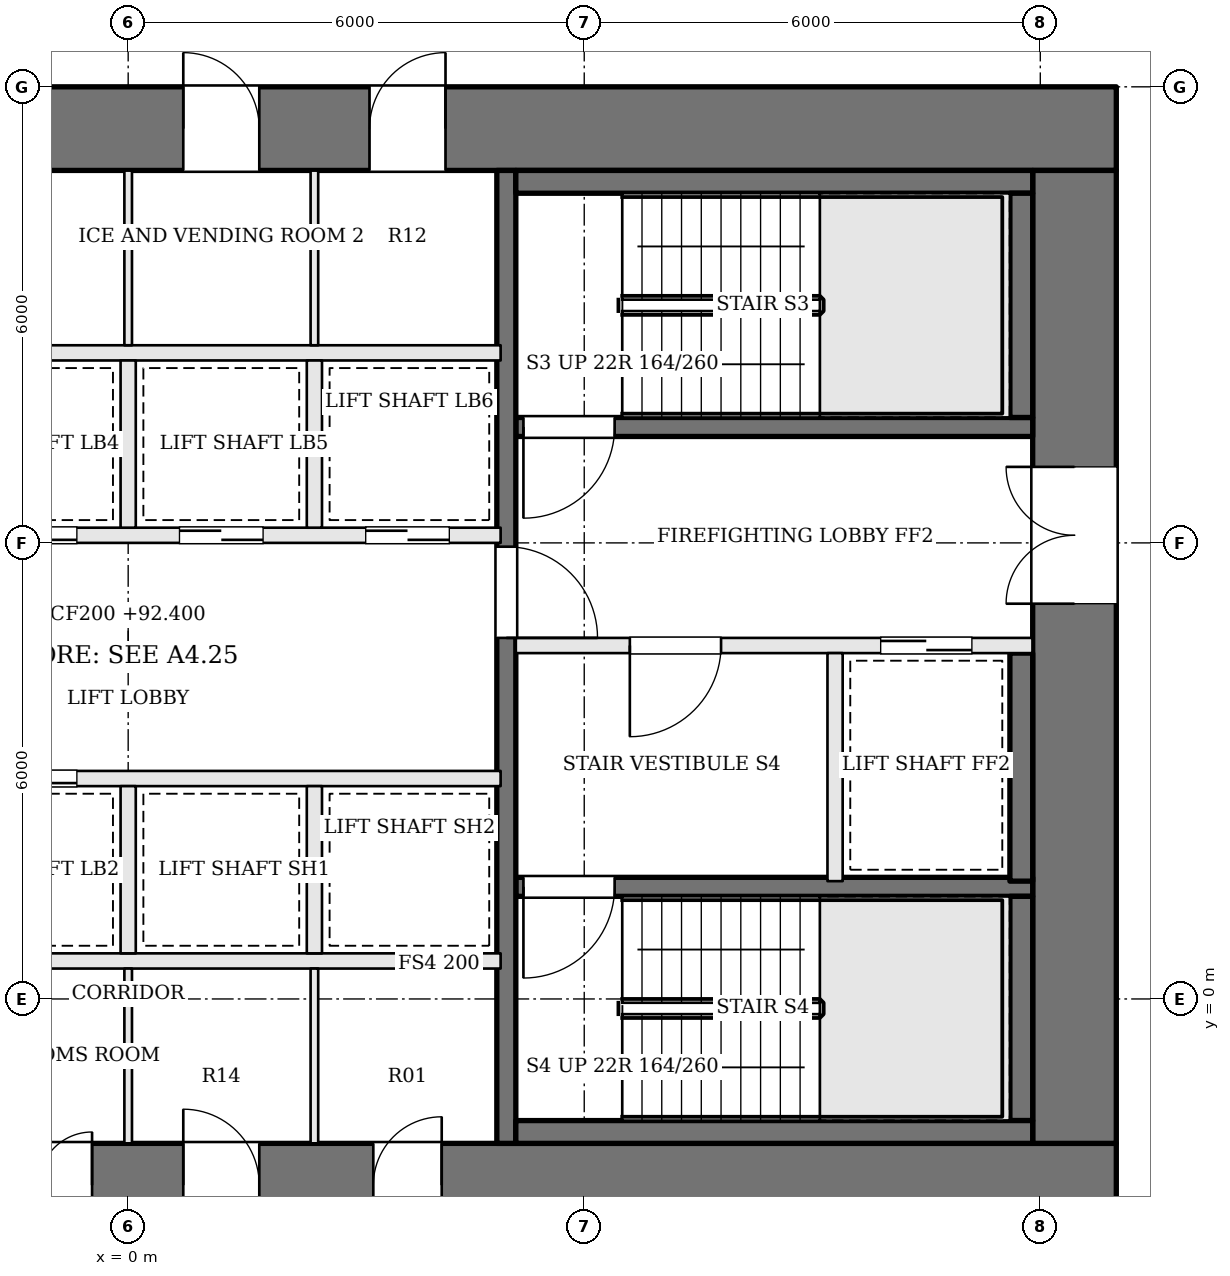
"""IFC4 building model, lengths in metres.
Left out: names, types, materials, properties, quantities, classifications, styles, units other than length and angle.
Written with IfcOpenShell. Run it as: python <this file> out.ifc"""

import sys

from ifc_helpers import new_model, si_unit, direction, frame, frame_2d, origin, place, context, subcontext, project, spatial, rectangle, extrude, element, fill, save


model = new_model("IFC4")
c1 = context("Model", 3, precision=1e-05, world=origin(), true_north=direction((0.0, 1.0)))
c2 = subcontext(c1, "Body", "Model", "MODEL_VIEW")
j1 = project(units=[si_unit("LENGTHUNIT", "METRE"), si_unit("PLANEANGLEUNIT", "RADIAN")], contexts=[c1])
p1 = place(None, origin())
s1 = spatial("IfcSite", under=j1, at=p1, CompositionType="ELEMENT")
p2 = place(p1, origin())
s2 = spatial("IfcBuilding", under=s1, at=p2, CompositionType="ELEMENT")
p3 = place(p2, frame((0.0, 0.0, 92.4)))
s3 = spatial("IfcBuildingStorey", under=s2, at=p3, CompositionType="ELEMENT", Elevation=92.4)
p4 = place(p3, frame((-13.0, 11.45, 0.0), z_axis=(0.0, 0.0, 1.0), x_axis=(1.0, 0.0, 0.0)))
e1 = element("IfcWall", 1, at=p4, inside=s3, PredefinedType="SHEAR", context=c2, shape_type="SweptSolid", body=[
    extrude(rectangle(XDim=26.0, YDim=1.1, at=frame_2d((13.0, 0.0))), origin(), (0.0, 0.0, 1.0), 3.6),
])
p5 = place(p4, frame((8.575, 0.0, 0.0)))
e2 = element("IfcOpeningElement", 2, at=p5, cuts=e1, PredefinedType="OPENING", context=c2, shape_type="SweptSolid", body=[
    extrude(rectangle(XDim=0.7, YDim=2.1, at=frame_2d((0.35, 1.05))), frame((0.0, 0.56, 0.0), z_axis=(0.0, -1.0, 0.0), x_axis=(1.0, 0.0, 0.0)), (0.0, 0.0, 1.0), 1.12),
])
p6 = place(p4, frame((10.875, 0.0, 0.0)))
e3 = element("IfcOpeningElement", 3, at=p6, cuts=e1, PredefinedType="OPENING", context=c2, shape_type="SweptSolid", body=[
    extrude(rectangle(XDim=1.0, YDim=2.1, at=frame_2d((0.5, 1.05))), frame((0.0, 0.56, 0.0), z_axis=(0.0, -1.0, 0.0), x_axis=(1.0, 0.0, 0.0)), (0.0, 0.0, 1.0), 1.12),
])
p7 = place(p4, frame((13.725, 0.0, 0.0)))
e4 = element("IfcOpeningElement", 4, at=p7, cuts=e1, PredefinedType="OPENING", context=c2, shape_type="SweptSolid", body=[
    extrude(rectangle(XDim=1.0, YDim=2.1, at=frame_2d((0.5, 1.05))), frame((0.0, 0.56, 0.0), z_axis=(0.0, -1.0, 0.0), x_axis=(1.0, 0.0, 0.0)), (0.0, 0.0, 1.0), 1.12),
])
p8 = place(p4, frame((16.175, 0.0, 0.0)))
e5 = element("IfcOpeningElement", 5, at=p8, cuts=e1, PredefinedType="OPENING", context=c2, shape_type="SweptSolid", body=[
    extrude(rectangle(XDim=1.0, YDim=2.1, at=frame_2d((0.5, 1.05))), frame((0.0, 0.56, 0.0), z_axis=(0.0, -1.0, 0.0), x_axis=(1.0, 0.0, 0.0)), (0.0, 0.0, 1.0), 1.12),
])
p9 = place(p3, frame((-13.0, -2.45, 0.0), z_axis=(0.0, 0.0, 1.0), x_axis=(1.0, 0.0, 0.0)))
e6 = element("IfcWall", 6, at=p9, inside=s3, PredefinedType="SHEAR", context=c2, shape_type="SweptSolid", body=[
    extrude(rectangle(XDim=26.0, YDim=1.1, at=frame_2d((13.0, 0.0))), origin(), (0.0, 0.0, 1.0), 3.6),
])
p10 = place(p9, frame((9.225, 0.0, 0.0)))
e7 = element("IfcOpeningElement", 7, at=p10, cuts=e6, PredefinedType="OPENING", context=c2, shape_type="SweptSolid", body=[
    extrude(rectangle(XDim=1.0, YDim=2.1, at=frame_2d((0.5, 1.05))), frame((0.0, 0.56, 0.0), z_axis=(0.0, -1.0, 0.0), x_axis=(1.0, 0.0, 0.0)), (0.0, 0.0, 1.0), 1.12),
])
p11 = place(p9, frame((11.825, 0.0, 0.0)))
e8 = element("IfcOpeningElement", 8, at=p11, cuts=e6, PredefinedType="OPENING", context=c2, shape_type="SweptSolid", body=[
    extrude(rectangle(XDim=0.7, YDim=2.1, at=frame_2d((0.35, 1.05))), frame((0.0, 0.56, 0.0), z_axis=(0.0, -1.0, 0.0), x_axis=(1.0, 0.0, 0.0)), (0.0, 0.0, 1.0), 1.12),
])
p12 = place(p9, frame((13.725, 0.0, 0.0)))
e9 = element("IfcOpeningElement", 9, at=p12, cuts=e6, PredefinedType="OPENING", context=c2, shape_type="SweptSolid", body=[
    extrude(rectangle(XDim=1.0, YDim=2.1, at=frame_2d((0.5, 1.05))), frame((0.0, 0.56, 0.0), z_axis=(0.0, -1.0, 0.0), x_axis=(1.0, 0.0, 0.0)), (0.0, 0.0, 1.0), 1.12),
])
p13 = place(p9, frame((16.225, 0.0, 0.0)))
e10 = element("IfcOpeningElement", 10, at=p13, cuts=e6, PredefinedType="OPENING", context=c2, shape_type="SweptSolid", body=[
    extrude(rectangle(XDim=0.9, YDim=2.1, at=frame_2d((0.45, 1.05))), frame((0.0, 0.56, 0.0), z_axis=(0.0, -1.0, 0.0), x_axis=(1.0, 0.0, 0.0)), (0.0, 0.0, 1.0), 1.12),
])
p14 = place(p3, frame((12.45, -1.9, 0.0), z_axis=(0.0, 0.0, 1.0), x_axis=(0.0, 1.0, 0.0)))
e11 = element("IfcWall", 11, at=p14, inside=s3, PredefinedType="SHEAR", context=c2, shape_type="SweptSolid", body=[
    extrude(rectangle(XDim=12.8, YDim=1.1, at=frame_2d((6.4, 0.0))), origin(), (0.0, 0.0, 1.0), 3.6),
])
p15 = place(p14, frame((7.1, 0.0, 0.0)))
e12 = element("IfcOpeningElement", 12, at=p15, cuts=e11, PredefinedType="OPENING", context=c2, shape_type="SweptSolid", body=[
    extrude(rectangle(XDim=1.8, YDim=2.1, at=frame_2d((0.9, 1.05))), frame((0.0, 0.56, 0.0), z_axis=(0.0, -1.0, 0.0), x_axis=(1.0, 0.0, 0.0)), (0.0, 0.0, 1.0), 1.12),
])
p16 = place(p3, frame((11.9, 7.525, 0.0), z_axis=(0.0, 0.0, 1.0), x_axis=(-1.0, 0.0, 0.0)))
e13 = element("IfcWall", 13, at=p16, inside=s3, PredefinedType="SOLIDWALL", context=c2, shape_type="SweptSolid", body=[
    extrude(rectangle(XDim=6.8, YDim=0.25, at=frame_2d((3.4, 0.0))), origin(), (0.0, 0.0, 1.0), 3.4),
])
p17 = place(p16, frame((5.5, 0.0, 0.0)))
e14 = element("IfcOpeningElement", 14, at=p17, cuts=e13, PredefinedType="OPENING", context=c2, shape_type="SweptSolid", body=[
    extrude(rectangle(XDim=1.2, YDim=2.1, at=frame_2d((0.6, 1.05))), frame((0.0, 0.135, 0.0), z_axis=(0.0, -1.0, 0.0), x_axis=(1.0, 0.0, 0.0)), (0.0, 0.0, 1.0), 0.27),
])
p18 = place(p3, frame((11.9, 4.65, 0.0), z_axis=(0.0, 0.0, 1.0), x_axis=(-1.0, 0.0, 0.0)))
e15 = element("IfcWall", 15, at=p18, inside=s3, PredefinedType="SOLIDWALL", context=c2, shape_type="SweptSolid", body=[
    extrude(rectangle(XDim=6.8, YDim=0.2, at=frame_2d((3.4, 0.0))), origin(), (0.0, 0.0, 1.0), 3.4),
])
p19 = place(p18, frame((4.1, 0.0, 0.0)))
e16 = element("IfcOpeningElement", 16, at=p19, cuts=e15, PredefinedType="OPENING", context=c2, shape_type="SweptSolid", body=[
    extrude(rectangle(XDim=1.2, YDim=2.1, at=frame_2d((0.6, 1.05))), frame((0.0, 0.11, 0.0), z_axis=(0.0, -1.0, 0.0), x_axis=(1.0, 0.0, 0.0)), (0.0, 0.0, 1.0), 0.22),
])
p20 = place(p18, frame((0.8, 0.0, 0.0)))
e17 = element("IfcOpeningElement", 17, at=p20, cuts=e15, PredefinedType="OPENING", context=c2, shape_type="SweptSolid", body=[
    extrude(rectangle(XDim=1.2, YDim=2.1, at=frame_2d((0.6, 1.05))), frame((0.0, 0.11, 0.0), z_axis=(0.0, -1.0, 0.0), x_axis=(1.0, 0.0, 0.0)), (0.0, 0.0, 1.0), 0.22),
])
p21 = place(p3, frame((11.9, 1.475, 0.0), z_axis=(0.0, 0.0, 1.0), x_axis=(-1.0, 0.0, 0.0)))
e18 = element("IfcWall", 18, at=p21, inside=s3, PredefinedType="SOLIDWALL", context=c2, shape_type="SweptSolid", body=[
    extrude(rectangle(XDim=6.8, YDim=0.25, at=frame_2d((3.4, 0.0))), origin(), (0.0, 0.0, 1.0), 3.4),
])
p22 = place(p21, frame((5.5, 0.0, 0.0)))
e19 = element("IfcOpeningElement", 19, at=p22, cuts=e18, PredefinedType="OPENING", context=c2, shape_type="SweptSolid", body=[
    extrude(rectangle(XDim=1.2, YDim=2.1, at=frame_2d((0.6, 1.05))), frame((0.0, 0.135, 0.0), z_axis=(0.0, -1.0, 0.0), x_axis=(1.0, 0.0, 0.0)), (0.0, 0.0, 1.0), 0.27),
])
p23 = place(p3, frame((9.3, 4.55, 0.0), z_axis=(0.0, 0.0, 1.0), x_axis=(0.0, -1.0, 0.0)))
e20 = element("IfcWall", 20, at=p23, inside=s3, PredefinedType="SOLIDWALL", context=c2, shape_type="SweptSolid", body=[
    extrude(rectangle(XDim=3.0, YDim=0.2, at=frame_2d((1.5, 0.0))), origin(), (0.0, 0.0, 1.0), 3.4),
])
p24 = place(p3, frame((4.975, 10.9, 0.0), z_axis=(0.0, 0.0, 1.0), x_axis=(0.0, -1.0, 0.0)))
e21 = element("IfcWall", 21, at=p24, inside=s3, PredefinedType="SOLIDWALL", context=c2, shape_type="SweptSolid", body=[
    extrude(rectangle(XDim=12.8, YDim=0.25, at=frame_2d((6.4, 0.0))), origin(), (0.0, 0.0, 1.0), 3.4),
])
p25 = place(p24, frame((4.95, 0.0, 0.0)))
e22 = element("IfcOpeningElement", 22, at=p25, cuts=e21, PredefinedType="OPENING", context=c2, shape_type="SweptSolid", body=[
    extrude(rectangle(XDim=1.2, YDim=2.1, at=frame_2d((0.6, 1.05))), frame((0.0, 0.135, 0.0), z_axis=(0.0, -1.0, 0.0), x_axis=(1.0, 0.0, 0.0)), (0.0, 0.0, 1.0), 0.27),
])
p26 = place(p3, frame((11.9, 10.75, 0.0), z_axis=(0.0, 0.0, 1.0), x_axis=(-1.0, 0.0, 0.0)))
e23 = element("IfcWall", 23, at=p26, inside=s3, PredefinedType="SOLIDWALL", context=c2, shape_type="SweptSolid", body=[
    extrude(rectangle(XDim=6.8, YDim=0.3, at=frame_2d((3.4, 0.0))), origin(), (0.0, 0.0, 1.0), 3.4),
])
p27 = place(p3, frame((11.75, 10.6, 0.0), z_axis=(0.0, 0.0, 1.0), x_axis=(0.0, -1.0, 0.0)))
e24 = element("IfcWall", 24, at=p27, inside=s3, PredefinedType="SOLIDWALL", context=c2, shape_type="SweptSolid", body=[
    extrude(rectangle(XDim=2.95, YDim=0.3, at=frame_2d((1.475, 0.0))), origin(), (0.0, 0.0, 1.0), 3.4),
])
p28 = place(p3, frame((11.75, 4.55, 0.0), z_axis=(0.0, 0.0, 1.0), x_axis=(0.0, -1.0, 0.0)))
e25 = element("IfcWall", 25, at=p28, inside=s3, PredefinedType="SOLIDWALL", context=c2, shape_type="SweptSolid", body=[
    extrude(rectangle(XDim=3.0, YDim=0.3, at=frame_2d((1.5, 0.0))), origin(), (0.0, 0.0, 1.0), 3.4),
])
p29 = place(p3, frame((11.75, 1.35, 0.0), z_axis=(0.0, 0.0, 1.0), x_axis=(0.0, -1.0, 0.0)))
e26 = element("IfcWall", 26, at=p29, inside=s3, PredefinedType="SOLIDWALL", context=c2, shape_type="SweptSolid", body=[
    extrude(rectangle(XDim=2.95, YDim=0.3, at=frame_2d((1.475, 0.0))), origin(), (0.0, 0.0, 1.0), 3.4),
])
p30 = place(p3, frame((11.9, -1.75, 0.0), z_axis=(0.0, 0.0, 1.0), x_axis=(-1.0, 0.0, 0.0)))
e27 = element("IfcWall", 27, at=p30, inside=s3, PredefinedType="SOLIDWALL", context=c2, shape_type="SweptSolid", body=[
    extrude(rectangle(XDim=6.8, YDim=0.3, at=frame_2d((3.4, 0.0))), origin(), (0.0, 0.0, 1.0), 3.4),
])
p31 = place(p3, frame((-4.9, 0.5, 0.0), z_axis=(0.0, 0.0, 1.0), x_axis=(1.0, 0.0, 0.0)))
e28 = element("IfcWall", 28, at=p31, inside=s3, PredefinedType="SOLIDWALL", context=c2, shape_type="SweptSolid", body=[
    extrude(rectangle(XDim=9.8, YDim=0.2, at=frame_2d((4.9, 0.0))), origin(), (0.0, 0.0, 1.0), 3.4),
])
p32 = place(p3, frame((-4.9, 2.9, 0.0), z_axis=(0.0, 0.0, 1.0), x_axis=(1.0, 0.0, 0.0)))
e29 = element("IfcWall", 29, at=p32, inside=s3, PredefinedType="SOLIDWALL", context=c2, shape_type="SweptSolid", body=[
    extrude(rectangle(XDim=9.8, YDim=0.2, at=frame_2d((4.9, 0.0))), origin(), (0.0, 0.0, 1.0), 3.4),
])
p33 = place(p32, frame((0.675, 0.0, 0.0)))
e30 = element("IfcOpeningElement", 30, at=p33, cuts=e29, PredefinedType="OPENING", context=c2, shape_type="SweptSolid", body=[
    extrude(rectangle(XDim=1.1, YDim=2.1, at=frame_2d((0.55, 1.05))), frame((0.0, 0.11, 0.0), z_axis=(0.0, -1.0, 0.0), x_axis=(1.0, 0.0, 0.0)), (0.0, 0.0, 1.0), 0.22),
])
p34 = place(p32, frame((3.125, 0.0, 0.0)))
e31 = element("IfcOpeningElement", 31, at=p34, cuts=e29, PredefinedType="OPENING", context=c2, shape_type="SweptSolid", body=[
    extrude(rectangle(XDim=1.1, YDim=2.1, at=frame_2d((0.55, 1.05))), frame((0.0, 0.11, 0.0), z_axis=(0.0, -1.0, 0.0), x_axis=(1.0, 0.0, 0.0)), (0.0, 0.0, 1.0), 0.22),
])
p35 = place(p3, frame((-4.9, 6.1, 0.0), z_axis=(0.0, 0.0, 1.0), x_axis=(1.0, 0.0, 0.0)))
e32 = element("IfcWall", 32, at=p35, inside=s3, PredefinedType="SOLIDWALL", context=c2, shape_type="SweptSolid", body=[
    extrude(rectangle(XDim=9.8, YDim=0.2, at=frame_2d((4.9, 0.0))), origin(), (0.0, 0.0, 1.0), 3.4),
])
p36 = place(p35, frame((0.675, 0.0, 0.0)))
e33 = element("IfcOpeningElement", 33, at=p36, cuts=e32, PredefinedType="OPENING", context=c2, shape_type="SweptSolid", body=[
    extrude(rectangle(XDim=1.1, YDim=2.1, at=frame_2d((0.55, 1.05))), frame((0.0, 0.11, 0.0), z_axis=(0.0, -1.0, 0.0), x_axis=(1.0, 0.0, 0.0)), (0.0, 0.0, 1.0), 0.22),
])
p37 = place(p35, frame((3.125, 0.0, 0.0)))
e34 = element("IfcOpeningElement", 34, at=p37, cuts=e32, PredefinedType="OPENING", context=c2, shape_type="SweptSolid", body=[
    extrude(rectangle(XDim=1.1, YDim=2.1, at=frame_2d((0.55, 1.05))), frame((0.0, 0.11, 0.0), z_axis=(0.0, -1.0, 0.0), x_axis=(1.0, 0.0, 0.0)), (0.0, 0.0, 1.0), 0.22),
])
p38 = place(p35, frame((5.575, 0.0, 0.0)))
e35 = element("IfcOpeningElement", 35, at=p38, cuts=e32, PredefinedType="OPENING", context=c2, shape_type="SweptSolid", body=[
    extrude(rectangle(XDim=1.1, YDim=2.1, at=frame_2d((0.55, 1.05))), frame((0.0, 0.11, 0.0), z_axis=(0.0, -1.0, 0.0), x_axis=(1.0, 0.0, 0.0)), (0.0, 0.0, 1.0), 0.22),
])
p39 = place(p35, frame((8.025, 0.0, 0.0)))
e36 = element("IfcOpeningElement", 36, at=p39, cuts=e32, PredefinedType="OPENING", context=c2, shape_type="SweptSolid", body=[
    extrude(rectangle(XDim=1.1, YDim=2.1, at=frame_2d((0.55, 1.05))), frame((0.0, 0.11, 0.0), z_axis=(0.0, -1.0, 0.0), x_axis=(1.0, 0.0, 0.0)), (0.0, 0.0, 1.0), 0.22),
])
p40 = place(p3, frame((-4.9, 8.5, 0.0), z_axis=(0.0, 0.0, 1.0), x_axis=(1.0, 0.0, 0.0)))
e37 = element("IfcWall", 37, at=p40, inside=s3, PredefinedType="SOLIDWALL", context=c2, shape_type="SweptSolid", body=[
    extrude(rectangle(XDim=9.8, YDim=0.2, at=frame_2d((4.9, 0.0))), origin(), (0.0, 0.0, 1.0), 3.4),
])
for number, where, z_axis, x_axis in (
    (38, (0.0, 0.6, 0.0), (0.0, 0.0, 1.0), (0.0, 1.0, 0.0)),
    (39, (2.45, 0.6, 0.0), (0.0, 0.0, 1.0), (0.0, 1.0, 0.0)),
    (40, (0.0, 6.2, 0.0), (0.0, 0.0, 1.0), (0.0, 1.0, 0.0)),
    (41, (2.45, 6.2, 0.0), (0.0, 0.0, 1.0), (0.0, 1.0, 0.0)),
):
    element("IfcWall", number, at=place(p3, frame(where, z_axis=z_axis, x_axis=x_axis)), inside=s3, PredefinedType="SOLIDWALL", context=c2, shape_type="SweptSolid", body=[
        extrude(rectangle(XDim=2.2, YDim=0.2, at=frame_2d((1.1, 0.0))), origin(), (0.0, 0.0, 1.0), 3.4),
    ])
for number, where, z_axis, x_axis in (
    (42, (0.0, -1.9, 0.0), (0.0, 0.0, 1.0), (0.0, 1.0, 0.0)),
    (43, (2.45, -1.9, 0.0), (0.0, 0.0, 1.0), (0.0, 1.0, 0.0)),
    (44, (0.0, 8.6, 0.0), (0.0, 0.0, 1.0), (0.0, 1.0, 0.0)),
    (45, (2.45, 8.6, 0.0), (0.0, 0.0, 1.0), (0.0, 1.0, 0.0)),
):
    element("IfcWall", number, at=place(p3, frame(where, z_axis=z_axis, x_axis=x_axis)), inside=s3, PredefinedType="PARTITIONING", context=c2, shape_type="SweptSolid", body=[
        extrude(rectangle(XDim=2.3, YDim=0.1, at=frame_2d((1.15, 0.0))), origin(), (0.0, 0.0, 1.0), 3.4),
    ])
p41 = place(p15, origin())
e46 = element("IfcDoor", 46, at=p41, inside=s3, OperationType="DOUBLE_DOOR_SINGLE_SWING", PredefinedType="DOOR", context=c2, shape_type="SweptSolid", body=[
    extrude(rectangle(XDim=1.8, YDim=2.1, at=frame_2d((0.9, 1.05))), frame((0.0, 0.025, 0.0), z_axis=(0.0, -1.0, 0.0), x_axis=(1.0, 0.0, 0.0)), (0.0, 0.0, 1.0), 0.05),
])
fill(e12, e46)
p42 = place(p25, origin())
e47 = element("IfcDoor", 47, at=p42, inside=s3, OperationType="SINGLE_SWING_RIGHT", PredefinedType="DOOR", context=c2, shape_type="SweptSolid", body=[
    extrude(rectangle(XDim=1.2, YDim=2.1, at=frame_2d((0.6, 1.05))), frame((0.0, 0.025, 0.0), z_axis=(0.0, -1.0, 0.0), x_axis=(1.0, 0.0, 0.0)), (0.0, 0.0, 1.0), 0.05),
])
fill(e22, e47)
p43 = place(p19, origin())
e48 = element("IfcDoor", 48, at=p43, inside=s3, OperationType="SINGLE_SWING_RIGHT", PredefinedType="DOOR", context=c2, shape_type="SweptSolid", body=[
    extrude(rectangle(XDim=1.2, YDim=2.1, at=frame_2d((0.6, 1.05))), frame((0.0, 0.025, 0.0), z_axis=(0.0, -1.0, 0.0), x_axis=(1.0, 0.0, 0.0)), (0.0, 0.0, 1.0), 0.05),
])
fill(e16, e48)
p44 = place(p17, origin())
e49 = element("IfcDoor", 49, at=p44, inside=s3, OperationType="SINGLE_SWING_RIGHT", PredefinedType="DOOR", context=c2, shape_type="SweptSolid", body=[
    extrude(rectangle(XDim=1.2, YDim=2.1, at=frame_2d((0.6, 1.05))), frame((0.0, 0.025, 0.0), z_axis=(0.0, -1.0, 0.0), x_axis=(1.0, 0.0, 0.0)), (0.0, 0.0, 1.0), 0.05),
])
fill(e14, e49)
p45 = place(p22, origin())
e50 = element("IfcDoor", 50, at=p45, inside=s3, OperationType="SINGLE_SWING_RIGHT", PredefinedType="DOOR", context=c2, shape_type="SweptSolid", body=[
    extrude(rectangle(XDim=1.2, YDim=2.1, at=frame_2d((0.6, 1.05))), frame((0.0, 0.025, 0.0), z_axis=(0.0, -1.0, 0.0), x_axis=(1.0, 0.0, 0.0)), (0.0, 0.0, 1.0), 0.05),
])
fill(e19, e50)
p46 = place(p20, origin())
e51 = element("IfcDoor", 51, at=p46, inside=s3, OperationType="SLIDING_TO_RIGHT", PredefinedType="DOOR", context=c2, shape_type="SweptSolid", body=[
    extrude(rectangle(XDim=1.2, YDim=2.1, at=frame_2d((0.6, 1.05))), frame((0.0, 0.025, 0.0), z_axis=(0.0, -1.0, 0.0), x_axis=(1.0, 0.0, 0.0)), (0.0, 0.0, 1.0), 0.05),
])
fill(e17, e51)
p47 = place(p34, origin())
e52 = element("IfcDoor", 52, at=p47, inside=s3, OperationType="SLIDING_TO_LEFT", PredefinedType="DOOR", context=c2, shape_type="SweptSolid", body=[
    extrude(rectangle(XDim=1.1, YDim=2.1, at=frame_2d((0.55, 1.05))), frame((0.0, 0.025, 0.0), z_axis=(0.0, -1.0, 0.0), x_axis=(1.0, 0.0, 0.0)), (0.0, 0.0, 1.0), 0.05),
])
fill(e31, e52)
p48 = place(p37, origin())
e53 = element("IfcDoor", 53, at=p48, inside=s3, OperationType="SLIDING_TO_LEFT", PredefinedType="DOOR", context=c2, shape_type="SweptSolid", body=[
    extrude(rectangle(XDim=1.1, YDim=2.1, at=frame_2d((0.55, 1.05))), frame((0.0, 0.025, 0.0), z_axis=(0.0, -1.0, 0.0), x_axis=(1.0, 0.0, 0.0)), (0.0, 0.0, 1.0), 0.05),
])
fill(e34, e53)
p49 = place(p38, origin())
e54 = element("IfcDoor", 54, at=p49, inside=s3, OperationType="SLIDING_TO_RIGHT", PredefinedType="DOOR", context=c2, shape_type="SweptSolid", body=[
    extrude(rectangle(XDim=1.1, YDim=2.1, at=frame_2d((0.55, 1.05))), frame((0.0, 0.025, 0.0), z_axis=(0.0, -1.0, 0.0), x_axis=(1.0, 0.0, 0.0)), (0.0, 0.0, 1.0), 0.05),
])
fill(e35, e54)
p50 = place(p39, origin())
e55 = element("IfcDoor", 55, at=p50, inside=s3, OperationType="SLIDING_TO_LEFT", PredefinedType="DOOR", context=c2, shape_type="SweptSolid", body=[
    extrude(rectangle(XDim=1.1, YDim=2.1, at=frame_2d((0.55, 1.05))), frame((0.0, 0.025, 0.0), z_axis=(0.0, -1.0, 0.0), x_axis=(1.0, 0.0, 0.0)), (0.0, 0.0, 1.0), 0.05),
])
fill(e36, e55)
p51 = place(p11, origin())
e56 = element("IfcDoor", 56, at=p51, inside=s3, OperationType="SINGLE_SWING_RIGHT", PredefinedType="DOOR", context=c2, shape_type="SweptSolid", body=[
    extrude(rectangle(XDim=0.7, YDim=2.1, at=frame_2d((0.35, 1.05))), frame((0.0, 0.025, 0.0), z_axis=(0.0, -1.0, 0.0), x_axis=(1.0, 0.0, 0.0)), (0.0, 0.0, 1.0), 0.05),
])
fill(e8, e56)
p52 = place(p12, origin())
e57 = element("IfcDoor", 57, at=p52, inside=s3, OperationType="SINGLE_SWING_LEFT", PredefinedType="DOOR", context=c2, shape_type="SweptSolid", body=[
    extrude(rectangle(XDim=1.0, YDim=2.1, at=frame_2d((0.5, 1.05))), frame((0.0, 0.025, 0.0), z_axis=(0.0, -1.0, 0.0), x_axis=(1.0, 0.0, 0.0)), (0.0, 0.0, 1.0), 0.05),
])
fill(e9, e57)
p53 = place(p13, origin())
e58 = element("IfcDoor", 58, at=p53, inside=s3, OperationType="SINGLE_SWING_RIGHT", PredefinedType="DOOR", context=c2, shape_type="SweptSolid", body=[
    extrude(rectangle(XDim=0.9, YDim=2.1, at=frame_2d((0.45, 1.05))), frame((0.0, 0.025, 0.0), z_axis=(0.0, -1.0, 0.0), x_axis=(1.0, 0.0, 0.0)), (0.0, 0.0, 1.0), 0.05),
])
fill(e10, e58)
p54 = place(p7, origin())
e59 = element("IfcDoor", 59, at=p54, inside=s3, OperationType="SINGLE_SWING_LEFT", PredefinedType="DOOR", context=c2, shape_type="SweptSolid", body=[
    extrude(rectangle(XDim=1.0, YDim=2.1, at=frame_2d((0.5, 1.05))), frame((0.0, 0.025, 0.0), z_axis=(0.0, -1.0, 0.0), x_axis=(1.0, 0.0, 0.0)), (0.0, 0.0, 1.0), 0.05),
])
fill(e4, e59)
p55 = place(p8, origin())
e60 = element("IfcDoor", 60, at=p55, inside=s3, OperationType="SINGLE_SWING_RIGHT", PredefinedType="DOOR", context=c2, shape_type="SweptSolid", body=[
    extrude(rectangle(XDim=1.0, YDim=2.1, at=frame_2d((0.5, 1.05))), frame((0.0, 0.025, 0.0), z_axis=(0.0, -1.0, 0.0), x_axis=(1.0, 0.0, 0.0)), (0.0, 0.0, 1.0), 0.05),
])
fill(e5, e60)
save(model, sys.argv[1])
